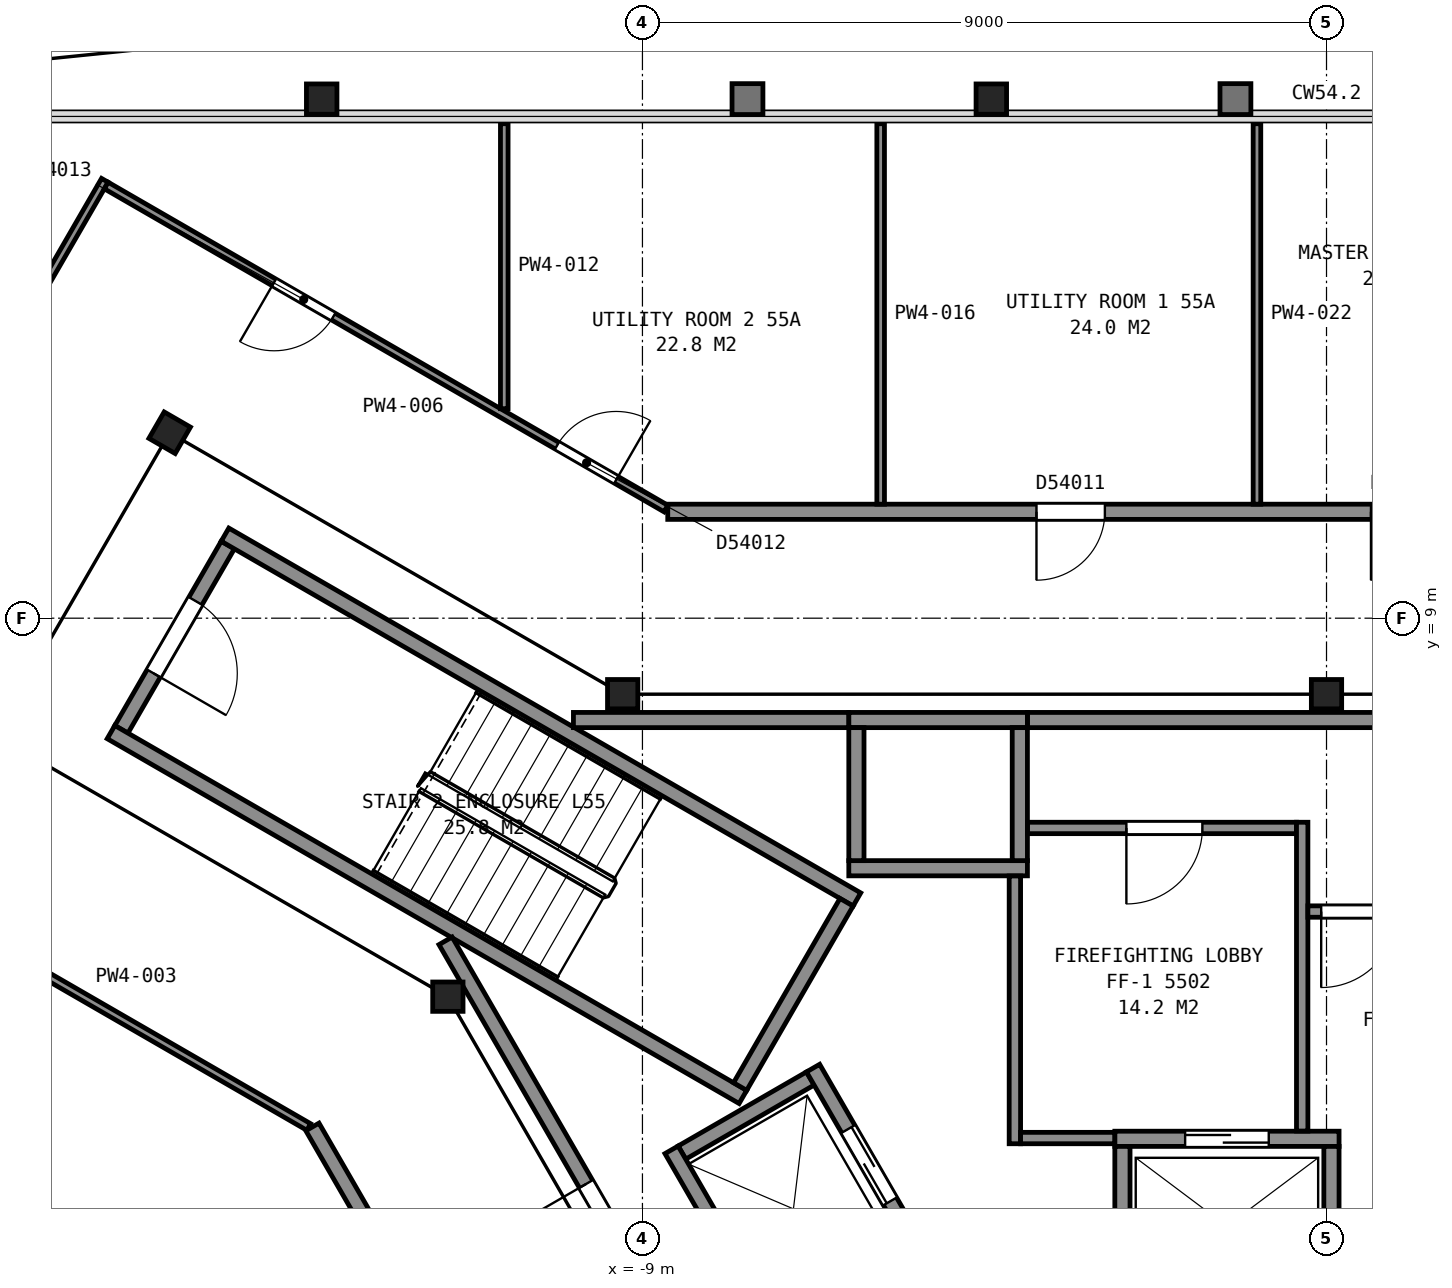
"""IFC4 building model, lengths in metres.
Left out: names, types, materials, properties, quantities, classifications, styles, units other than length and angle.
Written with IfcOpenShell. Run it as: python <this file> out.ifc"""

import sys

from ifc_helpers import new_model, si_unit, direction, frame, frame_2d, origin, origin_2d, place, context, subcontext, project, spatial, rectangle, i_section, extrude, element, fill, save


model = new_model("IFC4")
c1 = context("Model", 3, precision=1e-05, world=origin(), true_north=direction((0.0, 1.0)))
c2 = subcontext(c1, "Body", "Model", "MODEL_VIEW")
j1 = project(units=[si_unit("LENGTHUNIT", "METRE"), si_unit("PLANEANGLEUNIT", "RADIAN")], contexts=[c1])
p1 = place(None, origin())
s1 = spatial("IfcSite", under=j1, at=p1, CompositionType="ELEMENT")
p2 = place(p1, origin())
s2 = spatial("IfcBuilding", under=s1, at=p2, CompositionType="ELEMENT")
p3 = place(p2, frame((0.0, 0.0, 221.2)))
s3 = spatial("IfcBuildingStorey", under=s2, at=p3, CompositionType="ELEMENT", Elevation=221.2)
for number, where, z_axis, x_axis in (
    (1, (-4.41, 15.83, 0.0), (0.0, 0.0, 1.0), (1.0, 0.0, 0.0)),
    (2, (-13.22, 15.83, 0.0), (0.0, 0.0, 1.0), (1.0, 0.0, 0.0)),
):
    element("IfcColumn", number, at=place(p3, frame(where, z_axis=z_axis, x_axis=x_axis)), inside=s3, PredefinedType="COLUMN", context=c2, shape_type="SweptSolid", body=[
        extrude(i_section(OverallWidth=0.401, OverallDepth=0.399, WebThickness=0.025, FlangeThickness=0.04, FilletRadius=0.015, at=origin_2d()), origin(), (0.0, 0.0, 1.0), 3.7),
    ])
for number, where, z_axis, x_axis in (
    (3, (0.0, 8.0, 0.0), (0.0, 0.0, 1.0), (1.0, 0.0, 0.0)),
    (4, (-9.26, 8.0, 0.0), (0.0, 0.0, 1.0), (1.0, 0.0, 0.0)),
):
    element("IfcColumn", number, at=place(p3, frame(where, z_axis=z_axis, x_axis=x_axis)), inside=s3, PredefinedType="COLUMN", context=c2, shape_type="SweptSolid", body=[
        extrude(i_section(OverallWidth=0.399, OverallDepth=0.386, WebThickness=0.021, FlangeThickness=0.033, FilletRadius=0.015, at=origin_2d()), origin(), (0.0, 0.0, 1.0), 3.7),
    ])
p4 = place(p3, frame((-15.22, 11.44, 0.0), z_axis=(0.0, 0.0, 1.0), x_axis=(0.5, 0.866025403784, 0.0)))
e5 = element("IfcColumn", 5, at=p4, inside=s3, PredefinedType="COLUMN", context=c2, shape_type="SweptSolid", body=[
    extrude(i_section(OverallWidth=0.401, OverallDepth=0.399, WebThickness=0.025, FlangeThickness=0.04, FilletRadius=0.015, at=origin_2d()), origin(), (0.0, 0.0, 1.0), 3.7),
])
p5 = place(p3, frame((-11.56, 4.02, 0.0), z_axis=(0.0, 0.0, 1.0), x_axis=(1.0, 0.0, 0.0)))
e6 = element("IfcColumn", 6, at=p5, inside=s3, PredefinedType="COLUMN", context=c2, shape_type="SweptSolid", body=[
    extrude(i_section(OverallWidth=0.399, OverallDepth=0.386, WebThickness=0.021, FlangeThickness=0.033, FilletRadius=0.015, at=origin_2d()), origin(), (0.0, 0.0, 1.0), 3.7),
])
p6 = place(p3, frame((-14.455, 9.962, 0.0), z_axis=(0.0, 0.0, 1.0), x_axis=(-0.500049511043, -0.865996816683, 0.0)))
e7 = element("IfcWall", 7, at=p6, inside=s3, PredefinedType="PARTITIONING", context=c2, shape_type="SweptSolid", body=[
    extrude(rectangle(XDim=2.8, YDim=0.2, at=frame_2d((1.4, 0.0))), origin(), (0.0, 0.0, 1.0), 3.45),
])
p7 = place(p6, frame((0.85, 0.0, 0.0)))
e8 = element("IfcOpeningElement", 8, at=p7, cuts=e7, PredefinedType="OPENING", context=c2, shape_type="SweptSolid", body=[
    extrude(rectangle(XDim=1.1, YDim=2.1, at=frame_2d((0.55, 1.05))), frame((0.0, 0.11, 0.0), z_axis=(0.0, -1.0, 0.0), x_axis=(1.0, 0.0, 0.0)), (0.0, 0.0, 1.0), 0.22),
])
for number, where, z_axis, x_axis in (
    (9, (-7.678, 2.701, 0.0), (0.0, 0.0, 1.0), (-0.866, 0.5, 0.0)),
    (10, (-6.178, 5.299, 0.0), (0.0, 0.0, 1.0), (-0.866, 0.5, 0.0)),
):
    element("IfcWall", number, at=place(p3, frame(where, z_axis=z_axis, x_axis=x_axis)), inside=s3, PredefinedType="PARTITIONING", context=c2, shape_type="SweptSolid", body=[
        extrude(rectangle(XDim=9.6, YDim=0.2, at=frame_2d((4.8, 0.0))), origin(), (0.0, 0.0, 1.0), 3.45),
    ])
p8 = place(p3, frame((-6.315, 5.262, 0.0), z_axis=(0.0, 0.0, 1.0), x_axis=(-0.500049511043, -0.865996816683, 0.0)))
e11 = element("IfcWall", 11, at=p8, inside=s3, PredefinedType="PARTITIONING", context=c2, shape_type="SweptSolid", body=[
    extrude(rectangle(XDim=2.8, YDim=0.2, at=frame_2d((1.4, 0.0))), origin(), (0.0, 0.0, 1.0), 3.45),
])
p9 = place(p3, frame((-2.785, 2.15, 0.0), z_axis=(0.0, 0.0, 1.0), x_axis=(1.0, 0.0, 0.0)))
e12 = element("IfcWall", 12, at=p9, inside=s3, PredefinedType="PARTITIONING", context=c2, shape_type="SweptSolid", body=[
    extrude(rectangle(XDim=2.95, YDim=0.2, at=frame_2d((1.475, 0.0))), origin(), (0.0, 0.0, 1.0), 3.7),
])
p10 = place(p9, frame((0.925, 0.0, 0.0)))
e13 = element("IfcOpeningElement", 13, at=p10, cuts=e12, PredefinedType="OPENING", context=c2, shape_type="SweptSolid", body=[
    extrude(rectangle(XDim=1.1, YDim=2.1, at=frame_2d((0.55, 1.05))), frame((0.0, 0.11, 0.0), z_axis=(0.0, -1.0, 0.0), x_axis=(1.0, 0.0, 0.0)), (0.0, 0.0, 1.0), 0.22),
])
for number, where, z_axis, x_axis in (
    (14, (-6.285, 5.71, 0.0), (0.0, 0.0, 1.0), (1.0, 0.0, 0.0)),
    (15, (-6.285, 7.66, 0.0), (0.0, 0.0, 1.0), (1.0, 0.0, 0.0)),
):
    element("IfcWall", number, at=place(p3, frame(where, z_axis=z_axis, x_axis=x_axis)), inside=s3, PredefinedType="PARTITIONING", context=c2, shape_type="SweptSolid", body=[
        extrude(rectangle(XDim=2.35, YDim=0.2, at=frame_2d((1.175, 0.0))), origin(), (0.0, 0.0, 1.0), 3.7),
    ])
for number, where, z_axis, x_axis in (
    (16, (-8.48, 1.969, 0.0), (0.0, 0.0, 1.0), (0.866, 0.5, 0.0)),
    (17, (0.065, 0.1, 0.0), (0.0, 0.0, 1.0), (0.0, 1.0, 0.0)),
    (18, (-2.685, 0.1, 0.0), (0.0, 0.0, 1.0), (0.0, 1.0, 0.0)),
):
    element("IfcWall", number, at=place(p3, frame(where, z_axis=z_axis, x_axis=x_axis)), inside=s3, PredefinedType="PARTITIONING", context=c2, shape_type="SweptSolid", body=[
        extrude(rectangle(XDim=1.95, YDim=0.2, at=frame_2d((0.975, 0.0))), origin(), (0.0, 0.0, 1.0), 3.7),
    ])
for number, where, z_axis, x_axis in (
    (19, (-4.035, 5.81, 0.0), (0.0, 0.0, 1.0), (0.0, 1.0, 0.0)),
    (20, (-6.185, 5.81, 0.0), (0.0, 0.0, 1.0), (0.0, 1.0, 0.0)),
):
    element("IfcWall", number, at=place(p3, frame(where, z_axis=z_axis, x_axis=x_axis)), inside=s3, PredefinedType="PARTITIONING", context=c2, shape_type="SweptSolid", body=[
        extrude(rectangle(XDim=1.75, YDim=0.2, at=frame_2d((0.875, 0.0))), origin(), (0.0, 0.0, 1.0), 3.7),
    ])
p11 = place(p3, frame((-5.28, 0.525, 0.0), z_axis=(0.0, 0.0, 1.0), x_axis=(-0.500037662692, 0.866003658127, 0.0)))
e21 = element("IfcWall", 21, at=p11, inside=s3, PredefinedType="PARTITIONING", context=c2, shape_type="SweptSolid", body=[
    extrude(rectangle(XDim=2.95, YDim=0.2, at=frame_2d((1.475, 0.0))), origin(), (0.0, 0.0, 1.0), 3.7),
])
p12 = place(p11, frame((0.925, 0.0, 0.0)))
e22 = element("IfcOpeningElement", 22, at=p12, cuts=e21, PredefinedType="OPENING", context=c2, shape_type="SweptSolid", body=[
    extrude(rectangle(XDim=1.1, YDim=2.1, at=frame_2d((0.55, 1.05))), frame((0.0, 0.11, 0.0), z_axis=(0.0, -1.0, 0.0), x_axis=(1.0, 0.0, 0.0)), (0.0, 0.0, 1.0), 0.22),
])
p13 = place(p3, frame((-7.242, -0.376, 0.0), z_axis=(0.0, 0.0, 1.0), x_axis=(-0.499996545922, 0.866027397988, 0.0)))
e23 = element("IfcWall", 23, at=p13, inside=s3, PredefinedType="PARTITIONING", context=c2, shape_type="SweptSolid", body=[
    extrude(rectangle(XDim=2.75, YDim=0.2, at=frame_2d((1.375, 0.0))), origin(), (0.0, 0.0, 1.0), 3.7),
])
p14 = place(p3, frame((-11.591, 4.755, 0.0), z_axis=(0.0, 0.0, 1.0), x_axis=(0.500043977787, -0.866000011708, 0.0)))
e24 = element("IfcWall", 24, at=p14, inside=s3, PredefinedType="PARTITIONING", context=c2, shape_type="SweptSolid", body=[
    extrude(rectangle(XDim=6.617, YDim=0.2, at=frame_2d((3.308, 0.0))), origin(), (0.0, 0.0, 1.0), 3.45),
])
p15 = place(p14, frame((3.695, 0.0, 0.0)))
e25 = element("IfcOpeningElement", 25, at=p15, cuts=e24, PredefinedType="OPENING", context=c2, shape_type="SweptSolid", body=[
    extrude(rectangle(XDim=1.8, YDim=2.1, at=frame_2d((0.9, 1.05))), frame((0.0, 0.11, 0.0), z_axis=(0.0, -1.0, 0.0), x_axis=(1.0, 0.0, 0.0)), (0.0, 0.0, 1.0), 0.22),
])
p16 = place(p3, frame((-9.908, 7.66, 0.0), z_axis=(0.0, 0.0, 1.0), x_axis=(1.0, 0.0, 0.0)))
e26 = element("IfcWall", 26, at=p16, inside=s3, PredefinedType="PARTITIONING", context=c2, shape_type="SweptSolid", body=[
    extrude(rectangle(XDim=3.621, YDim=0.2, at=frame_2d((1.811, 0.0))), origin(), (0.0, 0.0, 1.0), 3.45),
])
p17 = place(p3, frame((-4.1, 2.085, 0.0), z_axis=(0.0, 0.0, 1.0), x_axis=(0.0, 1.0, 0.0)))
e27 = element("IfcWall", 27, at=p17, inside=s3, PredefinedType="PARTITIONING", context=c2, shape_type="SweptSolid", body=[
    extrude(rectangle(XDim=3.523, YDim=0.15, at=frame_2d((1.761, 0.0))), origin(), (0.0, 0.0, 1.0), 3.45),
])
p18 = place(p3, frame((-4.025, 2.16, 0.0), z_axis=(0.0, 0.0, 1.0), x_axis=(1.0, 0.0, 0.0)))
e28 = element("IfcWall", 28, at=p18, inside=s3, PredefinedType="PARTITIONING", context=c2, shape_type="SweptSolid", body=[
    extrude(rectangle(XDim=1.238, YDim=0.15, at=frame_2d((0.619, 0.0))), origin(), (0.0, 0.0, 1.0), 3.45),
])
p19 = place(p3, frame((-3.933, 6.24, 0.0), z_axis=(0.0, 0.0, 1.0), x_axis=(1.0, 0.0, 0.0)))
e29 = element("IfcWall", 29, at=p19, inside=s3, PredefinedType="PARTITIONING", context=c2, shape_type="SweptSolid", body=[
    extrude(rectangle(XDim=3.538, YDim=0.15, at=frame_2d((1.769, 0.0))), origin(), (0.0, 0.0, 1.0), 3.45),
])
p20 = place(p19, frame((1.3, 0.0, 0.0)))
e30 = element("IfcOpeningElement", 30, at=p20, cuts=e29, PredefinedType="OPENING", context=c2, shape_type="SweptSolid", body=[
    extrude(rectangle(XDim=1.0, YDim=2.1, at=frame_2d((0.5, 1.05))), frame((0.0, 0.085, 0.0), z_axis=(0.0, -1.0, 0.0), x_axis=(1.0, 0.0, 0.0)), (0.0, 0.0, 1.0), 0.17),
])
p21 = place(p3, frame((-3.933, 7.66, 0.0), z_axis=(0.0, 0.0, 1.0), x_axis=(1.0, 0.0, 0.0)))
e31 = element("IfcWall", 31, at=p21, inside=s3, PredefinedType="PARTITIONING", context=c2, shape_type="SweptSolid", body=[
    extrude(rectangle(XDim=13.841, YDim=0.2, at=frame_2d((6.92, 0.0))), origin(), (0.0, 0.0, 1.0), 3.45),
])
p22 = place(p3, frame((-0.32, 2.252, 0.0), z_axis=(0.0, 0.0, 1.0), x_axis=(0.0, 1.0, 0.0)))
e32 = element("IfcWall", 32, at=p22, inside=s3, PredefinedType="PARTITIONING", context=c2, shape_type="SweptSolid", body=[
    extrude(rectangle(XDim=4.063, YDim=0.15, at=frame_2d((2.031, 0.0))), origin(), (0.0, 0.0, 1.0), 3.45),
])
p23 = place(p3, frame((-0.245, 5.14, 0.0), z_axis=(0.0, 0.0, 1.0), x_axis=(1.0, 0.0, 0.0)))
e33 = element("IfcWall", 33, at=p23, inside=s3, PredefinedType="PARTITIONING", context=c2, shape_type="SweptSolid", body=[
    extrude(rectangle(XDim=5.11, YDim=0.15, at=frame_2d((2.555, 0.0))), origin(), (0.0, 0.0, 1.0), 3.45),
])
p24 = place(p23, frame((0.175, 0.0, 0.0)))
e34 = element("IfcOpeningElement", 34, at=p24, cuts=e33, PredefinedType="OPENING", context=c2, shape_type="SweptSolid", body=[
    extrude(rectangle(XDim=1.0, YDim=2.1, at=frame_2d((0.5, 1.05))), frame((0.0, 0.085, 0.0), z_axis=(0.0, -1.0, 0.0), x_axis=(1.0, 0.0, 0.0)), (0.0, 0.0, 1.0), 0.17),
])
p25 = place(p3, frame((-20.824, 6.539, 0.0), z_axis=(0.0, 0.0, 1.0), x_axis=(0.500297300687, 0.865853689098, 0.0)))
e35 = element("IfcWall", 35, at=p25, inside=s3, PredefinedType="PARTITIONING", context=c2, shape_type="SweptSolid", body=[
    extrude(rectangle(XDim=9.496, YDim=0.1, at=frame_2d((4.748, 0.0))), origin(), (0.0, 0.0, 1.0), 2.713),
])
p26 = place(p3, frame((-13.391, 2.305, 0.0), z_axis=(0.0, 0.0, 1.0), x_axis=(-0.86606177021, 0.499937006213, 0.0)))
e36 = element("IfcWall", 36, at=p26, inside=s3, PredefinedType="PARTITIONING", context=c2, shape_type="SweptSolid", body=[
    extrude(rectangle(XDim=8.504, YDim=0.1, at=frame_2d((4.252, 0.0))), origin(), (0.0, 0.0, 1.0), 2.713),
])
p27 = place(p26, frame((6.522, 0.0, 0.0)))
e37 = element("IfcOpeningElement", 37, at=p27, cuts=e36, PredefinedType="OPENING", context=c2, shape_type="SweptSolid", body=[
    extrude(rectangle(XDim=0.9, YDim=2.1, at=frame_2d((0.45, 1.05))), frame((0.0, 0.06, 0.0), z_axis=(0.0, -1.0, 0.0), x_axis=(1.0, 0.0, 0.0)), (0.0, 0.0, 1.0), 0.12),
])
p28 = place(p3, frame((-16.055, 14.693, 0.0), z_axis=(0.0, 0.0, 1.0), x_axis=(0.866070360466, -0.499922124658, 0.0)))
e38 = element("IfcWall", 38, at=p28, inside=s3, PredefinedType="PARTITIONING", context=c2, shape_type="SweptSolid", body=[
    extrude(rectangle(XDim=8.503, YDim=0.1, at=frame_2d((4.251, 0.0))), origin(), (0.0, 0.0, 1.0), 2.713),
])
p29 = place(p28, frame((6.847, 0.0, 0.0)))
e39 = element("IfcOpeningElement", 39, at=p29, cuts=e38, PredefinedType="OPENING", context=c2, shape_type="SweptSolid", body=[
    extrude(rectangle(XDim=0.9, YDim=2.1, at=frame_2d((0.45, 1.05))), frame((0.0, 0.06, 0.0), z_axis=(0.0, -1.0, 0.0), x_axis=(1.0, 0.0, 0.0)), (0.0, 0.0, 1.0), 0.12),
])
p30 = place(p28, frame((2.55, 0.0, 0.0)))
e40 = element("IfcOpeningElement", 40, at=p30, cuts=e38, PredefinedType="OPENING", context=c2, shape_type="SweptSolid", body=[
    extrude(rectangle(XDim=0.9, YDim=2.1, at=frame_2d((0.45, 1.05))), frame((0.0, 0.06, 0.0), z_axis=(0.0, -1.0, 0.0), x_axis=(1.0, 0.0, 0.0)), (0.0, 0.0, 1.0), 0.12),
])
p31 = place(p3, frame((-4.675, -12.706, 0.0), z_axis=(0.0, 0.0, 1.0), x_axis=(-0.49997440863, 0.866040178465, 0.0)))
e41 = element("IfcWall", 41, at=p31, inside=s3, PredefinedType="PARTITIONING", context=c2, shape_type="SweptSolid", body=[
    extrude(rectangle(XDim=17.335, YDim=0.2, at=frame_2d((8.667, 0.0))), origin(), (0.0, 0.0, 1.0), 2.713),
])
p32 = place(p31, frame((14.185, 0.0, 0.0)))
e42 = element("IfcOpeningElement", 42, at=p32, cuts=e41, PredefinedType="OPENING", context=c2, shape_type="SweptSolid", body=[
    extrude(rectangle(XDim=0.9, YDim=2.1, at=frame_2d((0.45, 1.05))), frame((0.0, 0.11, 0.0), z_axis=(0.0, -1.0, 0.0), x_axis=(1.0, 0.0, 0.0)), (0.0, 0.0, 1.0), 0.22),
])
p33 = place(p31, frame((6.895, 0.0, 0.0)))
e43 = element("IfcOpeningElement", 43, at=p33, cuts=e41, PredefinedType="OPENING", context=c2, shape_type="SweptSolid", body=[
    extrude(rectangle(XDim=0.9, YDim=2.1, at=frame_2d((0.45, 1.05))), frame((0.0, 0.11, 0.0), z_axis=(0.0, -1.0, 0.0), x_axis=(1.0, 0.0, 0.0)), (0.0, 0.0, 1.0), 0.22),
])
p34 = place(p31, frame((1.979, 0.0, 0.0)))
e44 = element("IfcOpeningElement", 44, at=p34, cuts=e41, PredefinedType="OPENING", context=c2, shape_type="SweptSolid", body=[
    extrude(rectangle(XDim=0.9, YDim=2.1, at=frame_2d((0.45, 1.05))), frame((0.0, 0.11, 0.0), z_axis=(0.0, -1.0, 0.0), x_axis=(1.0, 0.0, 0.0)), (0.0, 0.0, 1.0), 0.22),
])
p35 = place(p3, frame((-10.818, 11.757, 0.0), z_axis=(0.0, 0.0, 1.0), x_axis=(0.0, 1.0, 0.0)))
e45 = element("IfcWall", 45, at=p35, inside=s3, PredefinedType="PARTITIONING", context=c2, shape_type="SweptSolid", body=[
    extrude(rectangle(XDim=3.75, YDim=0.1, at=frame_2d((1.875, 0.0))), origin(), (0.0, 0.0, 1.0), 2.713),
])
p36 = place(p3, frame((-8.667, 10.4, 0.0), z_axis=(0.0, 0.0, 1.0), x_axis=(1.0, 0.0, 0.0)))
e46 = element("IfcWall", 46, at=p36, inside=s3, PredefinedType="PARTITIONING", context=c2, shape_type="SweptSolid", body=[
    extrude(rectangle(XDim=17.334, YDim=0.2, at=frame_2d((8.667, 0.0))), origin(), (0.0, 0.0, 1.0), 2.713),
])
p37 = place(p36, frame((9.252, 0.0, 0.0)))
e47 = element("IfcOpeningElement", 47, at=p37, cuts=e46, PredefinedType="OPENING", context=c2, shape_type="SweptSolid", body=[
    extrude(rectangle(XDim=0.9, YDim=2.1, at=frame_2d((0.45, 1.05))), frame((0.0, 0.11, 0.0), z_axis=(0.0, -1.0, 0.0), x_axis=(1.0, 0.0, 0.0)), (0.0, 0.0, 1.0), 0.22),
])
p38 = place(p36, frame((4.851, 0.0, 0.0)))
e48 = element("IfcOpeningElement", 48, at=p38, cuts=e46, PredefinedType="OPENING", context=c2, shape_type="SweptSolid", body=[
    extrude(rectangle(XDim=0.9, YDim=2.1, at=frame_2d((0.45, 1.05))), frame((0.0, 0.11, 0.0), z_axis=(0.0, -1.0, 0.0), x_axis=(1.0, 0.0, 0.0)), (0.0, 0.0, 1.0), 0.22),
])
for number, where, z_axis, x_axis in (
    (49, (-5.866, 10.5, 0.0), (0.0, 0.0, 1.0), (0.0, 1.0, 0.0)),
    (50, (-0.915, 10.5, 0.0), (0.0, 0.0, 1.0), (0.0, 1.0, 0.0)),
):
    element("IfcWall", number, at=place(p3, frame(where, z_axis=z_axis, x_axis=x_axis)), inside=s3, PredefinedType="PARTITIONING", context=c2, shape_type="SweptSolid", body=[
        extrude(rectangle(XDim=5.006, YDim=0.1, at=frame_2d((2.503, 0.0))), origin(), (0.0, 0.0, 1.0), 2.713),
    ])
p39 = place(p7, origin())
e51 = element("IfcDoor", 51, at=p39, inside=s3, OperationType="SINGLE_SWING_RIGHT", PredefinedType="DOOR", context=c2, shape_type="SweptSolid", body=[
    extrude(rectangle(XDim=1.1, YDim=2.1, at=frame_2d((0.55, 1.05))), frame((0.0, 0.025, 0.0), z_axis=(0.0, -1.0, 0.0), x_axis=(1.0, 0.0, 0.0)), (0.0, 0.0, 1.0), 0.05),
])
fill(e8, e51)
p40 = place(p10, origin())
e52 = element("IfcDoor", 52, at=p40, inside=s3, OperationType="SLIDING_TO_LEFT", PredefinedType="DOOR", context=c2, shape_type="SweptSolid", body=[
    extrude(rectangle(XDim=1.1, YDim=2.1, at=frame_2d((0.55, 1.05))), frame((0.0, 0.025, 0.0), z_axis=(0.0, -1.0, 0.0), x_axis=(1.0, 0.0, 0.0)), (0.0, 0.0, 1.0), 0.05),
])
fill(e13, e52)
p41 = place(p12, origin())
e53 = element("IfcDoor", 53, at=p41, inside=s3, OperationType="SLIDING_TO_LEFT", PredefinedType="DOOR", context=c2, shape_type="SweptSolid", body=[
    extrude(rectangle(XDim=1.1, YDim=2.1, at=frame_2d((0.55, 1.05))), frame((0.0, 0.025, 0.0), z_axis=(0.0, -1.0, 0.0), x_axis=(1.0, 0.0, 0.0)), (0.0, 0.0, 1.0), 0.05),
])
fill(e22, e53)
p42 = place(p15, origin())
e54 = element("IfcDoor", 54, at=p42, inside=s3, OperationType="DOUBLE_DOOR_SINGLE_SWING", PredefinedType="DOOR", context=c2, shape_type="SweptSolid", body=[
    extrude(rectangle(XDim=1.8, YDim=2.1, at=frame_2d((0.9, 1.05))), frame((0.0, 0.025, 0.0), z_axis=(0.0, -1.0, 0.0), x_axis=(1.0, 0.0, 0.0)), (0.0, 0.0, 1.0), 0.05),
])
fill(e25, e54)
p43 = place(p20, origin())
e55 = element("IfcDoor", 55, at=p43, inside=s3, OperationType="SINGLE_SWING_LEFT", PredefinedType="DOOR", context=c2, shape_type="SweptSolid", body=[
    extrude(rectangle(XDim=1.0, YDim=2.1, at=frame_2d((0.5, 1.05))), frame((0.0, 0.025, 0.0), z_axis=(0.0, -1.0, 0.0), x_axis=(1.0, 0.0, 0.0)), (0.0, 0.0, 1.0), 0.05),
])
fill(e30, e55)
p44 = place(p24, origin())
e56 = element("IfcDoor", 56, at=p44, inside=s3, OperationType="SINGLE_SWING_LEFT", PredefinedType="DOOR", context=c2, shape_type="SweptSolid", body=[
    extrude(rectangle(XDim=1.0, YDim=2.1, at=frame_2d((0.5, 1.05))), frame((0.0, 0.025, 0.0), z_axis=(0.0, -1.0, 0.0), x_axis=(1.0, 0.0, 0.0)), (0.0, 0.0, 1.0), 0.05),
])
fill(e34, e56)
p45 = place(p29, origin())
e57 = element("IfcDoor", 57, at=p45, inside=s3, OperationType="SINGLE_SWING_RIGHT", PredefinedType="DOOR", context=c2, shape_type="SweptSolid", body=[
    extrude(rectangle(XDim=0.9, YDim=2.1, at=frame_2d((0.45, 1.05))), frame((0.0, 0.025, 0.0), z_axis=(0.0, -1.0, 0.0), x_axis=(1.0, 0.0, 0.0)), (0.0, 0.0, 1.0), 0.05),
])
fill(e39, e57)
p46 = place(p30, origin())
e58 = element("IfcDoor", 58, at=p46, inside=s3, OperationType="SINGLE_SWING_LEFT", PredefinedType="DOOR", context=c2, shape_type="SweptSolid", body=[
    extrude(rectangle(XDim=0.9, YDim=2.1, at=frame_2d((0.45, 1.05))), frame((0.0, 0.025, 0.0), z_axis=(0.0, -1.0, 0.0), x_axis=(1.0, 0.0, 0.0)), (0.0, 0.0, 1.0), 0.05),
])
fill(e40, e58)
p47 = place(p37, origin())
e59 = element("IfcDoor", 59, at=p47, inside=s3, OperationType="SINGLE_SWING_LEFT", PredefinedType="DOOR", context=c2, shape_type="SweptSolid", body=[
    extrude(rectangle(XDim=0.9, YDim=2.1, at=frame_2d((0.45, 1.05))), frame((0.0, 0.025, 0.0), z_axis=(0.0, -1.0, 0.0), x_axis=(1.0, 0.0, 0.0)), (0.0, 0.0, 1.0), 0.05),
])
fill(e47, e59)
p48 = place(p38, origin())
e60 = element("IfcDoor", 60, at=p48, inside=s3, OperationType="SINGLE_SWING_LEFT", PredefinedType="DOOR", context=c2, shape_type="SweptSolid", body=[
    extrude(rectangle(XDim=0.9, YDim=2.1, at=frame_2d((0.45, 1.05))), frame((0.0, 0.025, 0.0), z_axis=(0.0, -1.0, 0.0), x_axis=(1.0, 0.0, 0.0)), (0.0, 0.0, 1.0), 0.05),
])
fill(e48, e60)
save(model, sys.argv[1])
